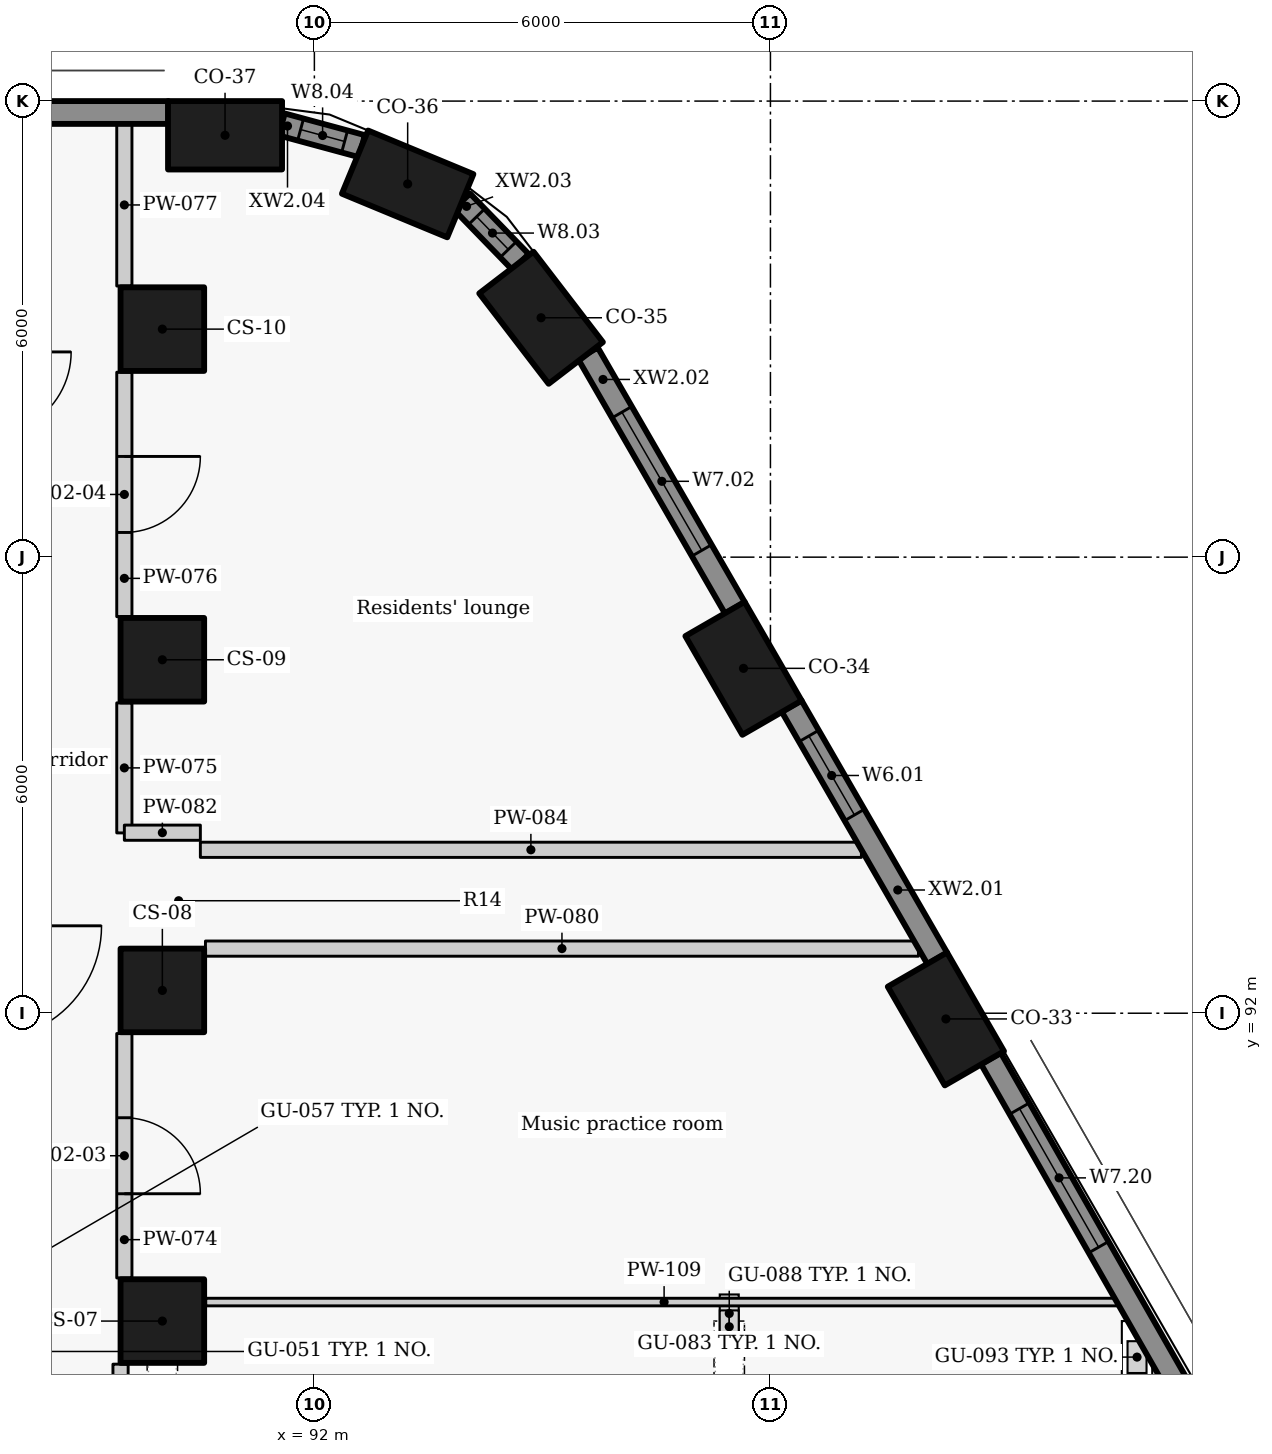
"""IFC4 building model, lengths in metres.
Left out: names, types, materials, properties, quantities, classifications, styles, units other than length and angle.
Written with IfcOpenShell. Run it as: python <this file> out.ifc"""

import sys

from ifc_helpers import new_model, si_unit, direction, frame, frame_2d, origin, origin_2d, place, context, subcontext, project, spatial, rectangle, extrude, element, fill, save


model = new_model("IFC4")
c1 = context("Model", 3, precision=1e-05, world=origin(), true_north=direction((0.0, 1.0)))
c2 = subcontext(c1, "Body", "Model", "MODEL_VIEW")
j1 = project(units=[si_unit("LENGTHUNIT", "METRE"), si_unit("PLANEANGLEUNIT", "RADIAN")], contexts=[c1])
p1 = place(None, origin())
s1 = spatial("IfcSite", under=j1, at=p1, CompositionType="ELEMENT")
p2 = place(p1, origin())
s2 = spatial("IfcBuilding", under=s1, at=p2, CompositionType="ELEMENT")
p3 = place(p2, frame((0.0, 0.0, 38.1)))
s3 = spatial("IfcBuildingStorey", under=s2, at=p3, CompositionType="ELEMENT", Elevation=38.1)
for number, where, z_axis, x_axis in (
    (1, (100.308, 91.925, 0.0), (0.0, 0.0, 1.0), (-0.5, 0.866, 0.0)),
    (2, (97.646, 96.537, 0.0), (0.0, 0.0, 1.0), (-0.5, 0.866, 0.0)),
    (3, (94.982, 101.149, 0.0), (0.0, 0.0, 1.0), (-0.609, 0.793, 0.0)),
    (4, (93.227, 102.91, 0.0), (0.0, 0.0, 1.0), (-0.924, 0.383, 0.0)),
    (5, (90.825, 103.55, 0.0), (0.0, 0.0, 1.0), (-1.0, 0.0, 0.0)),
):
    element("IfcColumn", number, at=place(p3, frame(where, z_axis=z_axis, x_axis=x_axis)), inside=s3, PredefinedType="COLUMN", context=c2, shape_type="SweptSolid", body=[
        extrude(rectangle(XDim=1.5, YDim=0.9, at=origin_2d()), origin(), (0.0, 0.0, 1.0), 3.3),
    ])
for number, where, z_axis, x_axis in (
    (6, (90.0, 87.95, 0.0), (0.0, 0.0, 1.0), (0.0, 1.0, 0.0)),
    (7, (90.0, 92.3, 0.0), (0.0, 0.0, 1.0), (0.0, 1.0, 0.0)),
    (8, (90.0, 96.65, 0.0), (0.0, 0.0, 1.0), (0.0, 1.0, 0.0)),
    (9, (90.0, 101.0, 0.0), (0.0, 0.0, 1.0), (0.0, 1.0, 0.0)),
):
    element("IfcColumn", number, at=place(p3, frame(where, z_axis=z_axis, x_axis=x_axis)), inside=s3, PredefinedType="COLUMN", context=c2, shape_type="SweptSolid", body=[
        extrude(rectangle(XDim=1.1, YDim=1.1, at=origin_2d()), origin(), (0.0, 0.0, 1.0), 3.3),
    ])
p4 = place(p3, frame((100.195, 92.721, 0.0), z_axis=(0.0, 0.0, 1.0), x_axis=(-0.500001735503, 0.866024401789, 0.0)))
e10 = element("IfcWall", 10, at=p4, inside=s3, PredefinedType="SOLIDWALL", context=c2, shape_type="SweptSolid", body=[
    extrude(rectangle(XDim=3.834, YDim=0.3, at=frame_2d((1.917, 0.0))), origin(), (0.0, 0.0, 1.0), 2.425),
])
p5 = place(p4, frame((2.179, 0.0, 0.9)))
e11 = element("IfcOpeningElement", 11, at=p5, cuts=e10, PredefinedType="OPENING", context=c2, shape_type="SweptSolid", body=[
    extrude(rectangle(XDim=1.2, YDim=1.1, at=frame_2d((0.6, 0.55))), frame((0.0, 0.16, 0.0), z_axis=(0.0, -1.0, 0.0), x_axis=(1.0, 0.0, 0.0)), (0.0, 0.0, 1.0), 0.32),
])
p6 = place(p3, frame((97.532, 97.333, 0.0), z_axis=(0.0, 0.0, 1.0), x_axis=(-0.499948341072, 0.866055227026, 0.0)))
e12 = element("IfcWall", 12, at=p6, inside=s3, PredefinedType="SOLIDWALL", context=c2, shape_type="SweptSolid", body=[
    extrude(rectangle(XDim=3.867, YDim=0.3, at=frame_2d((1.934, 0.0))), origin(), (0.0, 0.0, 1.0), 2.425),
])
p7 = place(p6, frame((0.872, 0.0, 0.9)))
e13 = element("IfcOpeningElement", 13, at=p7, cuts=e12, PredefinedType="OPENING", context=c2, shape_type="SweptSolid", body=[
    extrude(rectangle(XDim=2.1, YDim=1.1, at=frame_2d((1.05, 0.55))), frame((0.0, 0.16, 0.0), z_axis=(0.0, -1.0, 0.0), x_axis=(1.0, 0.0, 0.0)), (0.0, 0.0, 1.0), 0.32),
])
p8 = place(p3, frame((94.713, 101.883, 0.0), z_axis=(0.0, 0.0, 1.0), x_axis=(-0.696138968055, 0.717907053285, 0.0)))
e14 = element("IfcWall", 14, at=p8, inside=s3, PredefinedType="SOLIDWALL", context=c2, shape_type="SweptSolid", body=[
    extrude(rectangle(XDim=1.11, YDim=0.3, at=frame_2d((0.555, 0.0))), origin(), (0.0, 0.0, 1.0), 2.425),
])
p9 = place(p8, frame((0.231, 0.0, 0.9)))
e15 = element("IfcOpeningElement", 15, at=p9, cuts=e14, PredefinedType="OPENING", context=c2, shape_type="SweptSolid", body=[
    extrude(rectangle(XDim=0.6, YDim=1.1, at=frame_2d((0.3, 0.55))), frame((0.0, 0.16, 0.0), z_axis=(0.0, -1.0, 0.0), x_axis=(1.0, 0.0, 0.0)), (0.0, 0.0, 1.0), 0.32),
])
p10 = place(p3, frame((92.625, 103.407, 0.0), z_axis=(0.0, 0.0, 1.0), x_axis=(-0.96522637192, 0.261415475728, 0.0)))
e16 = element("IfcWall", 16, at=p10, inside=s3, PredefinedType="SOLIDWALL", context=c2, shape_type="SweptSolid", body=[
    extrude(rectangle(XDim=1.093, YDim=0.3, at=frame_2d((0.546, 0.0))), origin(), (0.0, 0.0, 1.0), 2.425),
])
p11 = place(p10, frame((0.236, 0.0, 0.9)))
e17 = element("IfcOpeningElement", 17, at=p11, cuts=e16, PredefinedType="OPENING", context=c2, shape_type="SweptSolid", body=[
    extrude(rectangle(XDim=0.6, YDim=1.1, at=frame_2d((0.3, 0.55))), frame((0.0, 0.16, 0.0), z_axis=(0.0, -1.0, 0.0), x_axis=(1.0, 0.0, 0.0)), (0.0, 0.0, 1.0), 0.32),
])
p12 = place(p3, frame((90.079, 103.85, 0.0), z_axis=(0.0, 0.0, 1.0), x_axis=(-1.0, 0.0, 0.0)))
e18 = element("IfcWall", 18, at=p12, inside=s3, PredefinedType="SOLIDWALL", context=c2, shape_type="SweptSolid", body=[
    extrude(rectangle(XDim=20.19, YDim=0.3, at=frame_2d((10.095, 0.0))), origin(), (0.0, 0.0, 1.0), 2.425),
])
p13 = place(p3, frame((106.185, 82.152, 0.0), z_axis=(0.0, 0.0, 1.0), x_axis=(-0.49599088679, 0.868327726277, 0.0)))
e19 = element("IfcWall", 19, at=p13, inside=s3, PredefinedType="SOLIDWALL", context=c2, shape_type="SweptSolid", body=[
    extrude(rectangle(XDim=10.656, YDim=0.3, at=frame_2d((5.328, 0.0))), origin(), (0.0, 0.0, 1.0), 2.425),
])
p14 = place(p13, frame((7.797, 0.0, 0.9)))
e20 = element("IfcOpeningElement", 20, at=p14, cuts=e19, PredefinedType="OPENING", context=c2, shape_type="SweptSolid", body=[
    extrude(rectangle(XDim=2.1, YDim=1.1, at=frame_2d((1.05, 0.55))), frame((0.0, 0.16, 0.0), z_axis=(0.0, -1.0, 0.0), x_axis=(1.0, 0.0, 0.0)), (0.0, 0.0, 1.0), 0.32),
])
p15 = place(p3, frame((89.5, 91.733, 0.0), z_axis=(0.0, 0.0, 1.0), x_axis=(0.0, -1.0, 0.0)))
e21 = element("IfcWall", 21, at=p15, inside=s3, PredefinedType="PARTITIONING", context=c2, shape_type="SweptSolid", body=[
    extrude(rectangle(XDim=3.216, YDim=0.2, at=frame_2d((1.608, 0.0))), origin(), (0.0, 0.0, 1.0), 3.025),
])
p16 = place(p15, frame((1.108, 0.0, 0.0)))
e22 = element("IfcOpeningElement", 22, at=p16, cuts=e21, PredefinedType="OPENING", context=c2, shape_type="SweptSolid", body=[
    extrude(rectangle(XDim=1.0, YDim=2.1, at=frame_2d((0.5, 1.05))), frame((0.0, 0.11, 0.0), z_axis=(0.0, -1.0, 0.0), x_axis=(1.0, 0.0, 0.0)), (0.0, 0.0, 1.0), 0.22),
])
p17 = place(p3, frame((89.5, 94.372, 0.0), z_axis=(0.0, 0.0, 1.0), x_axis=(0.0, 1.0, 0.0)))
e23 = element("IfcWall", 23, at=p17, inside=s3, PredefinedType="PARTITIONING", context=c2, shape_type="SweptSolid", body=[
    extrude(rectangle(XDim=1.711, YDim=0.2, at=frame_2d((0.855, 0.0))), origin(), (0.0, 0.0, 1.0), 3.025),
])
p18 = place(p3, frame((89.5, 100.433, 0.0), z_axis=(0.0, 0.0, 1.0), x_axis=(0.0, -1.0, 0.0)))
e24 = element("IfcWall", 24, at=p18, inside=s3, PredefinedType="PARTITIONING", context=c2, shape_type="SweptSolid", body=[
    extrude(rectangle(XDim=3.216, YDim=0.2, at=frame_2d((1.608, 0.0))), origin(), (0.0, 0.0, 1.0), 3.025),
])
p19 = place(p18, frame((1.108, 0.0, 0.0)))
e25 = element("IfcOpeningElement", 25, at=p19, cuts=e24, PredefinedType="OPENING", context=c2, shape_type="SweptSolid", body=[
    extrude(rectangle(XDim=1.0, YDim=2.1, at=frame_2d((0.5, 1.05))), frame((0.0, 0.11, 0.0), z_axis=(0.0, -1.0, 0.0), x_axis=(1.0, 0.0, 0.0)), (0.0, 0.0, 1.0), 0.22),
])
p20 = place(p3, frame((89.5, 101.567, 0.0), z_axis=(0.0, 0.0, 1.0), x_axis=(0.0, 1.0, 0.0)))
e26 = element("IfcWall", 26, at=p20, inside=s3, PredefinedType="PARTITIONING", context=c2, shape_type="SweptSolid", body=[
    extrude(rectangle(XDim=2.133, YDim=0.2, at=frame_2d((1.066, 0.0))), origin(), (0.0, 0.0, 1.0), 3.025),
])
p21 = place(p3, frame((89.45, 87.383, 0.0), z_axis=(0.0, 0.0, 1.0), x_axis=(0.0, -1.0, 0.0)))
e27 = element("IfcWall", 27, at=p21, inside=s3, PredefinedType="PARTITIONING", context=c2, shape_type="SweptSolid", body=[
    extrude(rectangle(XDim=14.766, YDim=0.2, at=frame_2d((7.383, 0.0))), origin(), (0.0, 0.0, 1.0), 3.025),
])
p22 = place(p21, frame((9.575, 0.0, 0.0)))
e28 = element("IfcOpeningElement", 28, at=p22, cuts=e27, PredefinedType="OPENING", context=c2, shape_type="SweptSolid", body=[
    extrude(rectangle(XDim=1.0, YDim=2.1, at=frame_2d((0.5, 1.05))), frame((0.0, 0.11, 0.0), z_axis=(0.0, -1.0, 0.0), x_axis=(1.0, 0.0, 0.0)), (0.0, 0.0, 1.0), 0.22),
])
p23 = place(p21, frame((4.258, 0.0, 0.0)))
e29 = element("IfcOpeningElement", 29, at=p23, cuts=e27, PredefinedType="OPENING", context=c2, shape_type="SweptSolid", body=[
    extrude(rectangle(XDim=1.0, YDim=2.1, at=frame_2d((0.5, 1.05))), frame((0.0, 0.11, 0.0), z_axis=(0.0, -1.0, 0.0), x_axis=(1.0, 0.0, 0.0)), (0.0, 0.0, 1.0), 0.22),
])
p24 = place(p3, frame((90.567, 92.85, 0.0), z_axis=(0.0, 0.0, 1.0), x_axis=(1.0, 0.0, 0.0)))
e30 = element("IfcWall", 30, at=p24, inside=s3, PredefinedType="PARTITIONING", context=c2, shape_type="SweptSolid", body=[
    extrude(rectangle(XDim=9.381, YDim=0.2, at=frame_2d((4.69, 0.0))), origin(), (0.0, 0.0, 1.0), 2.405),
])
p25 = place(p3, frame((89.5, 94.375, 0.0), z_axis=(0.0, 0.0, 1.0), x_axis=(1.0, 0.0, 0.0)))
e31 = element("IfcWall", 31, at=p25, inside=s3, PredefinedType="PARTITIONING", context=c2, shape_type="SweptSolid", body=[
    extrude(rectangle(XDim=1.0, YDim=0.2, at=frame_2d((0.5, 0.0))), origin(), (0.0, 0.0, 1.0), 2.505),
])
p26 = place(p3, frame((90.5, 94.15, 0.0), z_axis=(0.0, 0.0, 1.0), x_axis=(1.0, 0.0, 0.0)))
e32 = element("IfcWall", 32, at=p26, inside=s3, PredefinedType="PARTITIONING", context=c2, shape_type="SweptSolid", body=[
    extrude(rectangle(XDim=8.697, YDim=0.2, at=frame_2d((4.349, 0.0))), origin(), (0.0, 0.0, 1.0), 2.405),
])
p27 = place(p3, frame((90.57, 88.2, 0.0), z_axis=(0.0, 0.0, 1.0), x_axis=(1.0, 0.0, 0.0)))
e33 = element("IfcWall", 33, at=p27, inside=s3, PredefinedType="PARTITIONING", context=c2, shape_type="SweptSolid", body=[
    extrude(rectangle(XDim=12.062, YDim=0.1, at=frame_2d((6.031, 0.0))), origin(), (0.0, 0.0, 1.0), 2.405),
])
p28 = place(p5, origin())
e34 = element("IfcWindow", 34, at=p28, inside=s3, PartitioningType="SINGLE_PANEL", PredefinedType="WINDOW", context=c2, shape_type="SweptSolid", body=[
    extrude(rectangle(XDim=1.2, YDim=1.1, at=frame_2d((0.6, 0.55))), frame((0.0, 0.03, 0.0), z_axis=(0.0, -1.0, 0.0), x_axis=(1.0, 0.0, 0.0)), (0.0, 0.0, 1.0), 0.06),
])
fill(e11, e34)
p29 = place(p7, origin())
e35 = element("IfcWindow", 35, at=p29, inside=s3, PartitioningType="SINGLE_PANEL", PredefinedType="WINDOW", context=c2, shape_type="SweptSolid", body=[
    extrude(rectangle(XDim=2.1, YDim=1.1, at=frame_2d((1.05, 0.55))), frame((0.0, 0.03, 0.0), z_axis=(0.0, -1.0, 0.0), x_axis=(1.0, 0.0, 0.0)), (0.0, 0.0, 1.0), 0.06),
])
fill(e13, e35)
p30 = place(p9, origin())
e36 = element("IfcWindow", 36, at=p30, inside=s3, PartitioningType="SINGLE_PANEL", PredefinedType="WINDOW", context=c2, shape_type="SweptSolid", body=[
    extrude(rectangle(XDim=0.6, YDim=1.1, at=frame_2d((0.3, 0.55))), frame((0.0, 0.03, 0.0), z_axis=(0.0, -1.0, 0.0), x_axis=(1.0, 0.0, 0.0)), (0.0, 0.0, 1.0), 0.06),
])
fill(e15, e36)
p31 = place(p11, origin())
e37 = element("IfcWindow", 37, at=p31, inside=s3, PartitioningType="SINGLE_PANEL", PredefinedType="WINDOW", context=c2, shape_type="SweptSolid", body=[
    extrude(rectangle(XDim=0.6, YDim=1.1, at=frame_2d((0.3, 0.55))), frame((0.0, 0.03, 0.0), z_axis=(0.0, -1.0, 0.0), x_axis=(1.0, 0.0, 0.0)), (0.0, 0.0, 1.0), 0.06),
])
fill(e17, e37)
p32 = place(p14, origin())
e38 = element("IfcWindow", 38, at=p32, inside=s3, PartitioningType="SINGLE_PANEL", PredefinedType="WINDOW", context=c2, shape_type="SweptSolid", body=[
    extrude(rectangle(XDim=2.1, YDim=1.1, at=frame_2d((1.05, 0.55))), frame((0.0, 0.03, 0.0), z_axis=(0.0, -1.0, 0.0), x_axis=(1.0, 0.0, 0.0)), (0.0, 0.0, 1.0), 0.06),
])
fill(e20, e38)
p33 = place(p16, origin())
e39 = element("IfcDoor", 39, at=p33, inside=s3, OperationType="SINGLE_SWING_RIGHT", PredefinedType="DOOR", context=c2, shape_type="SweptSolid", body=[
    extrude(rectangle(XDim=1.0, YDim=2.1, at=frame_2d((0.5, 1.05))), frame((0.0, 0.025, 0.0), z_axis=(0.0, -1.0, 0.0), x_axis=(1.0, 0.0, 0.0)), (0.0, 0.0, 1.0), 0.05),
])
fill(e22, e39)
p34 = place(p19, origin())
e40 = element("IfcDoor", 40, at=p34, inside=s3, OperationType="SINGLE_SWING_LEFT", PredefinedType="DOOR", context=c2, shape_type="SweptSolid", body=[
    extrude(rectangle(XDim=1.0, YDim=2.1, at=frame_2d((0.5, 1.05))), frame((0.0, 0.025, 0.0), z_axis=(0.0, -1.0, 0.0), x_axis=(1.0, 0.0, 0.0)), (0.0, 0.0, 1.0), 0.05),
])
fill(e25, e40)
save(model, sys.argv[1])
